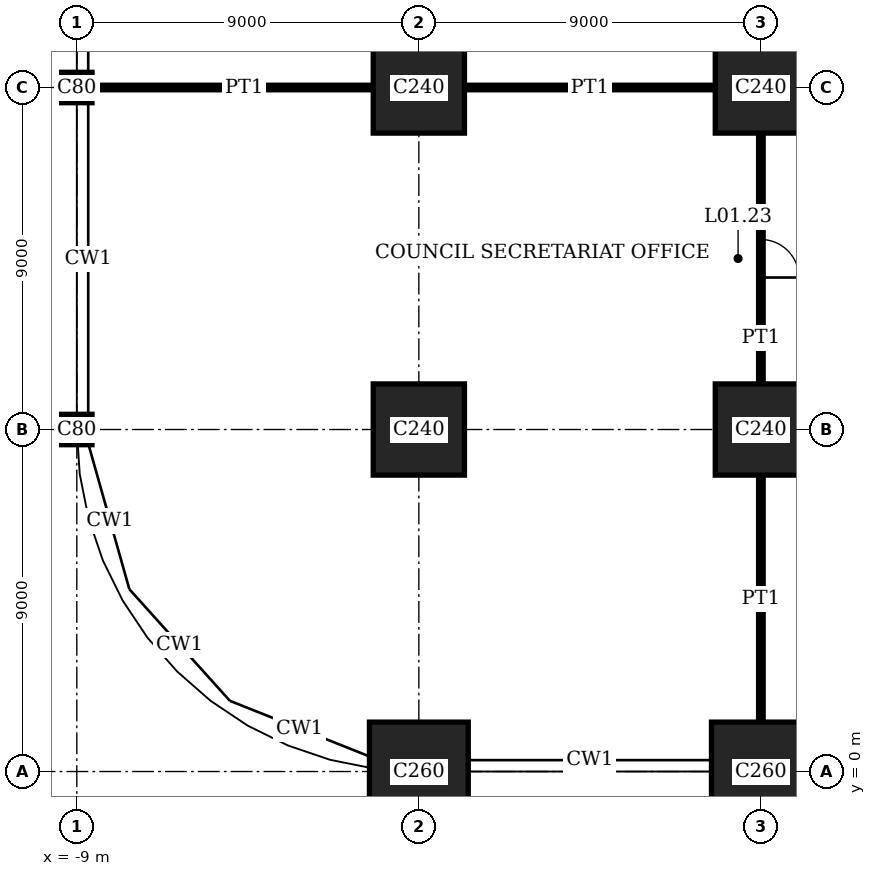
"""IFC4 building model, lengths in metres.
Left out: names, types, materials, properties, quantities, classifications, styles, units other than length and angle.
Written with IfcOpenShell. Run it as: python <this file> out.ifc"""

import sys

from ifc_helpers import new_model, si_unit, direction, frame, frame_2d, origin, origin_with_axes, origin_2d, place, context, subcontext, project, spatial, rectangle, extrude, element, fill, save


model = new_model("IFC4")
c1 = context("Model", 3, precision=1e-05, world=origin(), true_north=direction((0.0, 1.0)))
c2 = subcontext(c1, "Body", "Model", "MODEL_VIEW")
j1 = project(units=[si_unit("LENGTHUNIT", "METRE"), si_unit("PLANEANGLEUNIT", "RADIAN")], contexts=[c1])
p1 = place(None, origin())
s1 = spatial("IfcSite", under=j1, at=p1, CompositionType="ELEMENT")
p2 = place(p1, origin())
s2 = spatial("IfcBuilding", under=s1, at=p2, CompositionType="ELEMENT")
p3 = place(p2, frame((0.0, 0.0, 5.4)))
s3 = spatial("IfcBuildingStorey", under=s2, at=p3, CompositionType="ELEMENT", Elevation=5.4)
for number, where, z_axis, x_axis in (
    (1, (-9.0, 9.0, 0.0), (0.0, 0.0, 1.0), (1.0, 0.0, 0.0)),
    (2, (-9.0, 18.0, 0.0), (0.0, 0.0, 1.0), (1.0, 0.0, 0.0)),
):
    element("IfcColumn", number, at=place(p3, frame(where, z_axis=z_axis, x_axis=x_axis)), inside=s3, PredefinedType="COLUMN", context=c2, shape_type="SweptSolid", body=[
        extrude(rectangle(XDim=0.8, YDim=0.8, at=origin_2d()), origin(), (0.0, 0.0, 1.0), 5.4),
    ])
p4 = place(p3, origin_with_axes())
e3 = element("IfcColumn", 3, at=p4, inside=s3, PredefinedType="COLUMN", context=c2, shape_type="SweptSolid", body=[
    extrude(rectangle(XDim=2.6, YDim=2.6, at=origin_2d()), origin(), (0.0, 0.0, 1.0), 5.4),
])
for number, where, z_axis, x_axis in (
    (4, (0.0, 9.0, 0.0), (0.0, 0.0, 1.0), (1.0, 0.0, 0.0)),
    (5, (0.0, 18.0, 0.0), (0.0, 0.0, 1.0), (1.0, 0.0, 0.0)),
):
    element("IfcColumn", number, at=place(p3, frame(where, z_axis=z_axis, x_axis=x_axis)), inside=s3, PredefinedType="COLUMN", context=c2, shape_type="SweptSolid", body=[
        extrude(rectangle(XDim=2.4, YDim=2.4, at=origin_2d()), origin(), (0.0, 0.0, 1.0), 5.4),
    ])
p5 = place(p3, frame((9.0, 0.0, 0.0), z_axis=(0.0, 0.0, 1.0), x_axis=(1.0, 0.0, 0.0)))
e6 = element("IfcColumn", 6, at=p5, inside=s3, PredefinedType="COLUMN", context=c2, shape_type="SweptSolid", body=[
    extrude(rectangle(XDim=2.6, YDim=2.6, at=origin_2d()), origin(), (0.0, 0.0, 1.0), 5.4),
])
for number, where, z_axis, x_axis in (
    (7, (9.0, 9.0, 0.0), (0.0, 0.0, 1.0), (1.0, 0.0, 0.0)),
    (8, (9.0, 18.0, 0.0), (0.0, 0.0, 1.0), (1.0, 0.0, 0.0)),
):
    element("IfcColumn", number, at=place(p3, frame(where, z_axis=z_axis, x_axis=x_axis)), inside=s3, PredefinedType="COLUMN", context=c2, shape_type="SweptSolid", body=[
        extrude(rectangle(XDim=2.4, YDim=2.4, at=origin_2d()), origin(), (0.0, 0.0, 1.0), 5.4),
    ])
p6 = place(p3, frame((9.0, 1.3, 0.0), z_axis=(0.0, 0.0, 1.0), x_axis=(0.0, 1.0, 0.0)))
e9 = element("IfcWall", 9, at=p6, inside=s3, PredefinedType="PARTITIONING", context=c2, shape_type="SweptSolid", body=[
    extrude(rectangle(XDim=6.5, YDim=0.12, at=frame_2d((3.25, 0.0))), origin(), (0.0, 0.0, 1.0), 4.3),
])
p7 = place(p3, frame((9.0, 10.2, 0.0), z_axis=(0.0, 0.0, 1.0), x_axis=(0.0, 1.0, 0.0)))
e10 = element("IfcWall", 10, at=p7, inside=s3, PredefinedType="PARTITIONING", context=c2, shape_type="SweptSolid", body=[
    extrude(rectangle(XDim=6.6, YDim=0.12, at=frame_2d((3.3, 0.0))), origin(), (0.0, 0.0, 1.0), 4.3),
])
p8 = place(p7, frame((2.8, 0.0, 0.0)))
e11 = element("IfcOpeningElement", 11, at=p8, cuts=e10, PredefinedType="OPENING", context=c2, shape_type="SweptSolid", body=[
    extrude(rectangle(XDim=1.0, YDim=2.4, at=frame_2d((0.5, 1.2))), frame((0.0, 0.07, 0.0), z_axis=(0.0, -1.0, 0.0), x_axis=(1.0, 0.0, 0.0)), (0.0, 0.0, 1.0), 0.14),
])
p9 = place(p3, frame((-8.6, 18.0, 0.0), z_axis=(0.0, 0.0, 1.0), x_axis=(1.0, 0.0, 0.0)))
e12 = element("IfcWall", 12, at=p9, inside=s3, PredefinedType="PARTITIONING", context=c2, shape_type="SweptSolid", body=[
    extrude(rectangle(XDim=7.4, YDim=0.12, at=frame_2d((3.7, 0.0))), origin(), (0.0, 0.0, 1.0), 4.3),
])
p10 = place(p3, frame((1.2, 18.0, 0.0), z_axis=(0.0, 0.0, 1.0), x_axis=(1.0, 0.0, 0.0)))
e13 = element("IfcWall", 13, at=p10, inside=s3, PredefinedType="PARTITIONING", context=c2, shape_type="SweptSolid", body=[
    extrude(rectangle(XDim=6.6, YDim=0.12, at=frame_2d((3.3, 0.0))), origin(), (0.0, 0.0, 1.0), 4.3),
])
p11 = place(p8, origin())
e14 = element("IfcDoor", 14, at=p11, inside=s3, OperationType="SINGLE_SWING_LEFT", PredefinedType="DOOR", context=c2, shape_type="SweptSolid", body=[
    extrude(rectangle(XDim=1.0, YDim=2.4, at=frame_2d((0.5, 1.2))), frame((0.0, 0.025, 0.0), z_axis=(0.0, -1.0, 0.0), x_axis=(1.0, 0.0, 0.0)), (0.0, 0.0, 1.0), 0.05),
])
fill(e11, e14)
save(model, sys.argv[1])
